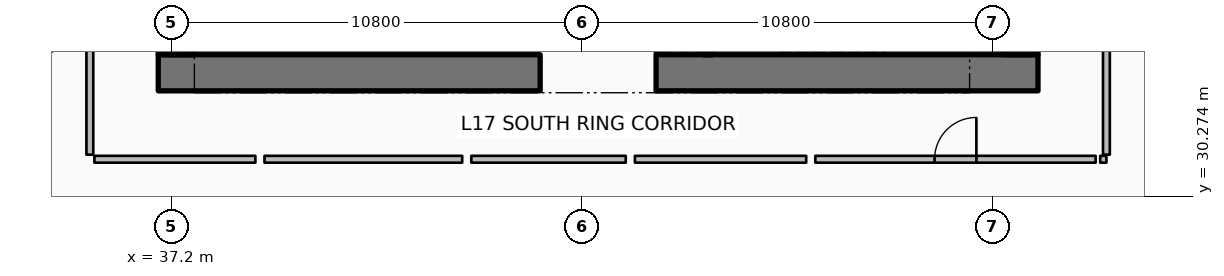
"""IFC4 building model, lengths in metres.
Left out: names, types, materials, properties, quantities, classifications, styles, units other than length and angle.
Written with IfcOpenShell. Run it as: python <this file> out.ifc"""

import sys

from ifc_helpers import new_model, si_unit, direction, frame, frame_2d, origin, place, context, subcontext, project, spatial, rectangle, extrude, element, fill, save


model = new_model("IFC4")
c1 = context("Model", 3, precision=1e-05, world=origin(), true_north=direction((0.0, 1.0)))
c2 = subcontext(c1, "Body", "Model", "MODEL_VIEW")
j1 = project(units=[si_unit("LENGTHUNIT", "METRE"), si_unit("PLANEANGLEUNIT", "RADIAN")], contexts=[c1])
p1 = place(None, origin())
s1 = spatial("IfcSite", under=j1, at=p1, CompositionType="ELEMENT")
p2 = place(p1, origin())
s2 = spatial("IfcBuilding", under=s1, at=p2, CompositionType="ELEMENT")
p3 = place(p2, frame((0.0, 0.0, 71.4)))
s3 = spatial("IfcBuildingStorey", under=s2, at=p3, CompositionType="ELEMENT", Elevation=71.4)
p4 = place(p3, frame((36.85, 33.525, 0.0), z_axis=(0.0, 0.0, 1.0), x_axis=(1.0, 0.0, 0.0)))
e1 = element("IfcWall", 1, at=p4, inside=s3, PredefinedType="SHEAR", context=c2, shape_type="SweptSolid", body=[
    extrude(rectangle(XDim=10.05, YDim=0.95, at=frame_2d((5.025, 0.0))), origin(), (0.0, 0.0, 1.0), 3.75),
])
p5 = place(p3, frame((49.95, 33.525, 0.0), z_axis=(0.0, 0.0, 1.0), x_axis=(1.0, 0.0, 0.0)))
e2 = element("IfcWall", 2, at=p5, inside=s3, PredefinedType="SHEAR", context=c2, shape_type="SweptSolid", body=[
    extrude(rectangle(XDim=10.05, YDim=0.95, at=frame_2d((5.025, 0.0))), origin(), (0.0, 0.0, 1.0), 3.75),
])
for number, where, z_axis, x_axis in (
    (3, (37.325, 34.0, 0.0), (0.0, 0.0, 1.0), (0.0, 1.0, 0.0)),
    (4, (59.525, 34.0, 0.0), (0.0, 0.0, 1.0), (0.0, 1.0, 0.0)),
):
    element("IfcWall", number, at=place(p3, frame(where, z_axis=z_axis, x_axis=x_axis)), inside=s3, PredefinedType="SHEAR", context=c2, shape_type="SweptSolid", body=[
        extrude(rectangle(XDim=16.0, YDim=0.95, at=frame_2d((8.0, 0.0))), origin(), (0.0, 0.0, 1.0), 3.75),
    ])
p6 = place(p3, frame((51.31, 34.0, 0.0), z_axis=(0.0, 0.0, 1.0), x_axis=(0.0, 1.0, 0.0)))
e5 = element("IfcWall", 5, at=p6, inside=s3, PredefinedType="SHEAR", context=c2, shape_type="SweptSolid", body=[
    extrude(rectangle(XDim=3.5, YDim=0.28, at=frame_2d((1.75, 0.0))), origin(), (0.0, 0.0, 1.0), 3.75),
])
p7 = place(p3, frame((34.954, 34.694, 0.0), z_axis=(0.0, 0.0, 1.0), x_axis=(-0.872493465611, -0.488625779577, 0.0)))
e6 = element("IfcWall", 6, at=p7, inside=s3, PredefinedType="PARTITIONING", context=c2, shape_type="SweptSolid", body=[
    extrude(rectangle(XDim=16.586, YDim=0.18, at=frame_2d((8.293, 0.0))), origin(), (0.0, 0.0, 1.0), 2.307),
])
p8 = place(p3, frame((54.14, 31.25, 0.0), z_axis=(0.0, 0.0, 1.0), x_axis=(1.0, 0.0, 0.0)))
e7 = element("IfcWall", 7, at=p8, inside=s3, PredefinedType="PARTITIONING", context=c2, shape_type="SweptSolid", body=[
    extrude(rectangle(XDim=7.376, YDim=0.18, at=frame_2d((3.688, 0.0))), origin(), (0.0, 0.0, 1.0), 2.307),
])
p9 = place(p8, frame((3.138, 0.0, 0.0)))
e8 = element("IfcOpeningElement", 8, at=p9, cuts=e7, PredefinedType="OPENING", context=c2, shape_type="SweptSolid", body=[
    extrude(rectangle(XDim=1.1, YDim=2.1, at=frame_2d((0.55, 1.05))), frame((0.0, 0.1, 0.0), z_axis=(0.0, -1.0, 0.0), x_axis=(1.0, 0.0, 0.0)), (0.0, 0.0, 1.0), 0.2),
])
p10 = place(p3, frame((35.05, 34.628, 0.0), z_axis=(0.0, 0.0, 1.0), x_axis=(0.0, -1.0, 0.0)))
e9 = element("IfcWall", 9, at=p10, inside=s3, PredefinedType="PARTITIONING", context=c2, shape_type="SweptSolid", body=[
    extrude(rectangle(XDim=3.258, YDim=0.18, at=frame_2d((1.629, 0.0))), origin(), (0.0, 0.0, 1.0), 2.307),
])
p11 = place(p3, frame((35.17, 31.25, 0.0), z_axis=(0.0, 0.0, 1.0), x_axis=(1.0, 0.0, 0.0)))
e10 = element("IfcWall", 10, at=p11, inside=s3, PredefinedType="PARTITIONING", context=c2, shape_type="SweptSolid", body=[
    extrude(rectangle(XDim=4.236, YDim=0.18, at=frame_2d((2.118, 0.0))), origin(), (0.0, 0.0, 1.0), 2.307),
])
p12 = place(p3, frame((39.646, 31.25, 0.0), z_axis=(0.0, 0.0, 1.0), x_axis=(1.0, 0.0, 0.0)))
e11 = element("IfcWall", 11, at=p12, inside=s3, PredefinedType="PARTITIONING", context=c2, shape_type="SweptSolid", body=[
    extrude(rectangle(XDim=5.203, YDim=0.18, at=frame_2d((2.601, 0.0))), origin(), (0.0, 0.0, 1.0), 2.307),
])
p13 = place(p3, frame((45.088, 31.25, 0.0), z_axis=(0.0, 0.0, 1.0), x_axis=(1.0, 0.0, 0.0)))
e12 = element("IfcWall", 12, at=p13, inside=s3, PredefinedType="PARTITIONING", context=c2, shape_type="SweptSolid", body=[
    extrude(rectangle(XDim=4.064, YDim=0.18, at=frame_2d((2.032, 0.0))), origin(), (0.0, 0.0, 1.0), 2.307),
])
p14 = place(p3, frame((49.392, 31.25, 0.0), z_axis=(0.0, 0.0, 1.0), x_axis=(1.0, 0.0, 0.0)))
e13 = element("IfcWall", 13, at=p14, inside=s3, PredefinedType="PARTITIONING", context=c2, shape_type="SweptSolid", body=[
    extrude(rectangle(XDim=4.508, YDim=0.18, at=frame_2d((2.254, 0.0))), origin(), (0.0, 0.0, 1.0), 2.307),
])
p15 = place(p3, frame((61.636, 31.25, 0.0), z_axis=(0.0, 0.0, 1.0), x_axis=(1.0, 0.0, 0.0)))
e14 = element("IfcWall", 14, at=p15, inside=s3, PredefinedType="PARTITIONING", context=c2, shape_type="SweptSolid", body=[
    extrude(rectangle(XDim=0.164, YDim=0.18, at=frame_2d((0.082, 0.0))), origin(), (0.0, 0.0, 1.0), 2.307),
])
p16 = place(p3, frame((61.8, 31.37, 0.0), z_axis=(0.0, 0.0, 1.0), x_axis=(0.0, 1.0, 0.0)))
e15 = element("IfcWall", 15, at=p16, inside=s3, PredefinedType="PARTITIONING", context=c2, shape_type="SweptSolid", body=[
    extrude(rectangle(XDim=6.618, YDim=0.18, at=frame_2d((3.309, 0.0))), origin(), (0.0, 0.0, 1.0), 2.307),
])
p17 = place(p9, origin())
e16 = element("IfcDoor", 16, at=p17, inside=s3, OperationType="SINGLE_SWING_RIGHT", PredefinedType="DOOR", context=c2, shape_type="SweptSolid", body=[
    extrude(rectangle(XDim=1.1, YDim=2.1, at=frame_2d((0.55, 1.05))), frame((0.0, 0.025, 0.0), z_axis=(0.0, -1.0, 0.0), x_axis=(1.0, 0.0, 0.0)), (0.0, 0.0, 1.0), 0.05),
])
fill(e8, e16)
save(model, sys.argv[1])
